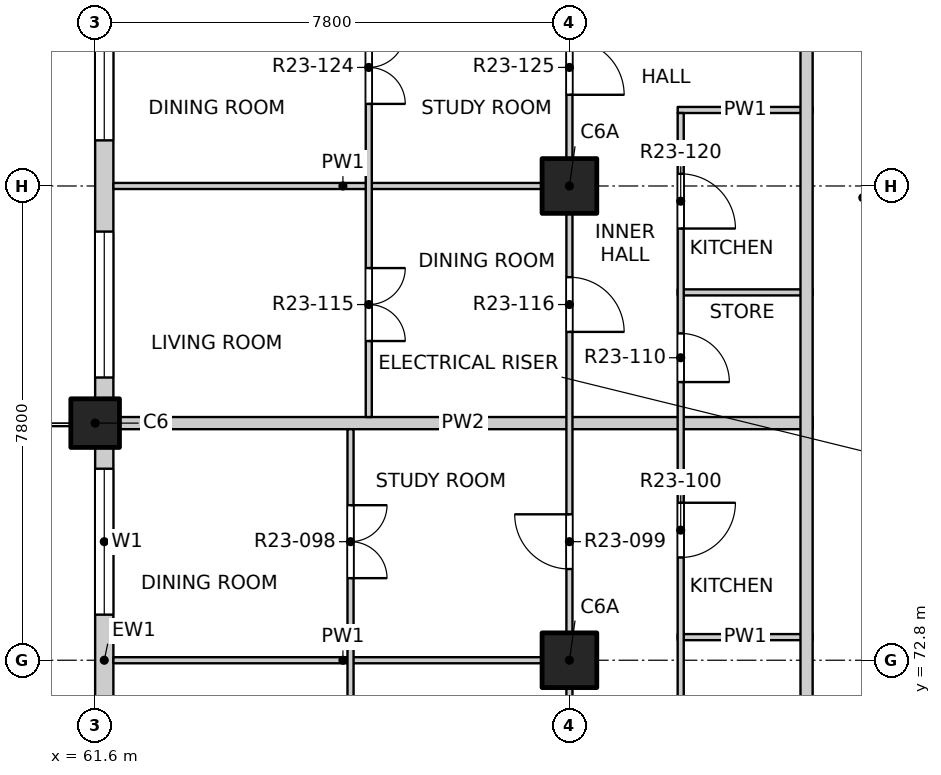
"""IFC4 building model, lengths in metres.
Left out: names, types, materials, properties, quantities, classifications, styles, units other than length and angle.
Written with IfcOpenShell. Run it as: python <this file> out.ifc"""

import sys

from ifc_helpers import new_model, si_unit, direction, frame, frame_2d, origin, origin_2d, place, context, subcontext, project, spatial, rectangle, extrude, element, fill, save


model = new_model("IFC4")
c1 = context("Model", 3, precision=1e-05, world=origin(), true_north=direction((0.0, 1.0)))
c2 = subcontext(c1, "Body", "Model", "MODEL_VIEW")
j1 = project(units=[si_unit("LENGTHUNIT", "METRE"), si_unit("PLANEANGLEUNIT", "RADIAN")], contexts=[c1])
p1 = place(None, origin())
s1 = spatial("IfcSite", under=j1, at=p1, CompositionType="ELEMENT")
p2 = place(p1, origin())
s2 = spatial("IfcBuilding", under=s1, at=p2, CompositionType="ELEMENT")
p3 = place(p2, frame((0.0, 0.0, 234.7)))
s3 = spatial("IfcBuildingStorey", under=s2, at=p3, CompositionType="ELEMENT", Elevation=234.7)
p4 = place(p3, frame((61.6, 76.7, -0.25), z_axis=(0.0, 0.0, 1.0), x_axis=(1.0, 0.0, 0.0)))
e1 = element("IfcColumn", 1, at=p4, inside=s3, PredefinedType="COLUMN", context=c2, shape_type="SweptSolid", body=[
    extrude(rectangle(XDim=0.8, YDim=0.8, at=origin_2d()), origin(), (0.0, 0.0, 1.0), 3.4),
])
for number, where, z_axis, x_axis in (
    (2, (69.4, 72.8, -0.25), (0.0, 0.0, 1.0), (1.0, 0.0, 0.0)),
    (3, (69.4, 80.6, -0.25), (0.0, 0.0, 1.0), (1.0, 0.0, 0.0)),
):
    element("IfcColumn", number, at=place(p3, frame(where, z_axis=z_axis, x_axis=x_axis)), inside=s3, PredefinedType="COLUMN", context=c2, shape_type="SweptSolid", body=[
        extrude(rectangle(XDim=0.9, YDim=0.9, at=origin_2d()), origin(), (0.0, 0.0, 1.0), 3.4),
    ])
p5 = place(p3, frame((61.75, 69.3, 0.0), z_axis=(0.0, 0.0, 1.0), x_axis=(0.0, 1.0, 0.0)))
e4 = element("IfcWall", 4, at=p5, inside=s3, PredefinedType="SOLIDWALL", context=c2, shape_type="SweptSolid", body=[
    extrude(rectangle(XDim=7.0, YDim=0.3, at=frame_2d((3.5, 0.0))), origin(), (0.0, 0.0, 1.0), 2.7),
])
p6 = place(p5, frame((0.65, 0.0, 0.0)))
e5 = element("IfcOpeningElement", 5, at=p6, cuts=e4, PredefinedType="OPENING", context=c2, shape_type="SweptSolid", body=[
    extrude(rectangle(XDim=1.8, YDim=2.4, at=frame_2d((0.9, 1.2))), frame((0.0, 0.16, 0.0), z_axis=(0.0, -1.0, 0.0), x_axis=(1.0, 0.0, 0.0)), (0.0, 0.0, 1.0), 0.32),
])
p7 = place(p5, frame((4.25, 0.0, 0.9)))
e6 = element("IfcOpeningElement", 6, at=p7, cuts=e4, PredefinedType="OPENING", context=c2, shape_type="SweptSolid", body=[
    extrude(rectangle(XDim=2.4, YDim=1.8, at=frame_2d((1.2, 0.9))), frame((0.0, 0.16, 0.0), z_axis=(0.0, -1.0, 0.0), x_axis=(1.0, 0.0, 0.0)), (0.0, 0.0, 1.0), 0.32),
])
p8 = place(p3, frame((61.75, 77.1, 0.0), z_axis=(0.0, 0.0, 1.0), x_axis=(0.0, 1.0, 0.0)))
e7 = element("IfcWall", 7, at=p8, inside=s3, PredefinedType="SOLIDWALL", context=c2, shape_type="SweptSolid", body=[
    extrude(rectangle(XDim=7.4, YDim=0.3, at=frame_2d((3.7, 0.0))), origin(), (0.0, 0.0, 1.0), 2.7),
])
p9 = place(p8, frame((0.35, 0.0, 0.9)))
e8 = element("IfcOpeningElement", 8, at=p9, cuts=e7, PredefinedType="OPENING", context=c2, shape_type="SweptSolid", body=[
    extrude(rectangle(XDim=2.4, YDim=1.8, at=frame_2d((1.2, 0.9))), frame((0.0, 0.16, 0.0), z_axis=(0.0, -1.0, 0.0), x_axis=(1.0, 0.0, 0.0)), (0.0, 0.0, 1.0), 0.32),
])
p10 = place(p8, frame((4.25, 0.0, 0.9)))
e9 = element("IfcOpeningElement", 9, at=p10, cuts=e7, PredefinedType="OPENING", context=c2, shape_type="SweptSolid", body=[
    extrude(rectangle(XDim=2.4, YDim=1.8, at=frame_2d((1.2, 0.9))), frame((0.0, 0.16, 0.0), z_axis=(0.0, -1.0, 0.0), x_axis=(1.0, 0.0, 0.0)), (0.0, 0.0, 1.0), 0.32),
])
p11 = place(p3, frame((61.9, 72.8, 0.0), z_axis=(0.0, 0.0, 1.0), x_axis=(1.0, 0.0, 0.0)))
e10 = element("IfcWall", 10, at=p11, inside=s3, PredefinedType="PARTITIONING", context=c2, shape_type="SweptSolid", body=[
    extrude(rectangle(XDim=7.55, YDim=0.1, at=frame_2d((3.775, 0.0))), origin(), (0.0, 0.0, 1.0), 3.15),
])
p12 = place(p3, frame((71.18, 73.18, 0.0), z_axis=(0.0, 0.0, 1.0), x_axis=(1.0, 0.0, 0.0)))
e11 = element("IfcWall", 11, at=p12, inside=s3, PredefinedType="PARTITIONING", context=c2, shape_type="SweptSolid", body=[
    extrude(rectangle(XDim=2.22, YDim=0.1, at=frame_2d((1.11, 0.0))), origin(), (0.0, 0.0, 1.0), 3.15),
])
p13 = place(p3, frame((61.9, 76.7, 0.0), z_axis=(0.0, 0.0, 1.0), x_axis=(1.0, 0.0, 0.0)))
e12 = element("IfcWall", 12, at=p13, inside=s3, PredefinedType="PARTITIONING", context=c2, shape_type="SweptSolid", body=[
    extrude(rectangle(XDim=11.5, YDim=0.2, at=frame_2d((5.75, 0.0))), origin(), (0.0, 0.0, 1.0), 2.55),
])
p14 = place(p3, frame((71.18, 78.85, 0.0), z_axis=(0.0, 0.0, 1.0), x_axis=(1.0, 0.0, 0.0)))
e13 = element("IfcWall", 13, at=p14, inside=s3, PredefinedType="PARTITIONING", context=c2, shape_type="SweptSolid", body=[
    extrude(rectangle(XDim=2.22, YDim=0.1, at=frame_2d((1.11, 0.0))), origin(), (0.0, 0.0, 1.0), 3.15),
])
p15 = place(p3, frame((61.9, 80.6, 0.0), z_axis=(0.0, 0.0, 1.0), x_axis=(1.0, 0.0, 0.0)))
e14 = element("IfcWall", 14, at=p15, inside=s3, PredefinedType="PARTITIONING", context=c2, shape_type="SweptSolid", body=[
    extrude(rectangle(XDim=7.55, YDim=0.1, at=frame_2d((3.775, 0.0))), origin(), (0.0, 0.0, 1.0), 3.15),
])
p16 = place(p3, frame((71.18, 81.85, 0.0), z_axis=(0.0, 0.0, 1.0), x_axis=(1.0, 0.0, 0.0)))
e15 = element("IfcWall", 15, at=p16, inside=s3, PredefinedType="PARTITIONING", context=c2, shape_type="SweptSolid", body=[
    extrude(rectangle(XDim=2.22, YDim=0.1, at=frame_2d((1.11, 0.0))), origin(), (0.0, 0.0, 1.0), 3.15),
])
p17 = place(p3, frame((65.8, 61.2, 0.0), z_axis=(0.0, 0.0, 1.0), x_axis=(0.0, 1.0, 0.0)))
e16 = element("IfcWall", 16, at=p17, inside=s3, PredefinedType="PARTITIONING", context=c2, shape_type="SweptSolid", body=[
    extrude(rectangle(XDim=15.4, YDim=0.1, at=frame_2d((7.7, 0.0))), origin(), (0.0, 0.0, 1.0), 3.15),
])
p18 = place(p17, frame((0.425, 0.0, 0.0)))
e17 = element("IfcOpeningElement", 17, at=p18, cuts=e16, PredefinedType="OPENING", context=c2, shape_type="SweptSolid", body=[
    extrude(rectangle(XDim=0.9, YDim=2.1, at=frame_2d((0.45, 1.05))), frame((0.0, 0.06, 0.0), z_axis=(0.0, -1.0, 0.0), x_axis=(1.0, 0.0, 0.0)), (0.0, 0.0, 1.0), 0.12),
])
p19 = place(p17, frame((2.375, 0.0, 0.0)))
e18 = element("IfcOpeningElement", 18, at=p19, cuts=e16, PredefinedType="OPENING", context=c2, shape_type="SweptSolid", body=[
    extrude(rectangle(XDim=0.9, YDim=2.1, at=frame_2d((0.45, 1.05))), frame((0.0, 0.06, 0.0), z_axis=(0.0, -1.0, 0.0), x_axis=(1.0, 0.0, 0.0)), (0.0, 0.0, 1.0), 0.12),
])
p20 = place(p17, frame((4.325, 0.0, 0.0)))
e19 = element("IfcOpeningElement", 19, at=p20, cuts=e16, PredefinedType="OPENING", context=c2, shape_type="SweptSolid", body=[
    extrude(rectangle(XDim=0.9, YDim=2.1, at=frame_2d((0.45, 1.05))), frame((0.0, 0.06, 0.0), z_axis=(0.0, -1.0, 0.0), x_axis=(1.0, 0.0, 0.0)), (0.0, 0.0, 1.0), 0.12),
])
p21 = place(p17, frame((6.275, 0.0, 0.0)))
e20 = element("IfcOpeningElement", 20, at=p21, cuts=e16, PredefinedType="OPENING", context=c2, shape_type="SweptSolid", body=[
    extrude(rectangle(XDim=0.9, YDim=2.1, at=frame_2d((0.45, 1.05))), frame((0.0, 0.06, 0.0), z_axis=(0.0, -1.0, 0.0), x_axis=(1.0, 0.0, 0.0)), (0.0, 0.0, 1.0), 0.12),
])
p22 = place(p17, frame((9.05, 0.0, 0.0)))
e21 = element("IfcOpeningElement", 21, at=p22, cuts=e16, PredefinedType="OPENING", context=c2, shape_type="SweptSolid", body=[
    extrude(rectangle(XDim=1.2, YDim=2.1, at=frame_2d((0.6, 1.05))), frame((0.0, 0.06, 0.0), z_axis=(0.0, -1.0, 0.0), x_axis=(1.0, 0.0, 0.0)), (0.0, 0.0, 1.0), 0.12),
])
p23 = place(p17, frame((12.95, 0.0, 0.0)))
e22 = element("IfcOpeningElement", 22, at=p23, cuts=e16, PredefinedType="OPENING", context=c2, shape_type="SweptSolid", body=[
    extrude(rectangle(XDim=1.2, YDim=2.1, at=frame_2d((0.6, 1.05))), frame((0.0, 0.06, 0.0), z_axis=(0.0, -1.0, 0.0), x_axis=(1.0, 0.0, 0.0)), (0.0, 0.0, 1.0), 0.12),
])
p24 = place(p3, frame((66.1, 76.8, 0.0), z_axis=(0.0, 0.0, 1.0), x_axis=(0.0, 1.0, 0.0)))
e23 = element("IfcWall", 23, at=p24, inside=s3, PredefinedType="PARTITIONING", context=c2, shape_type="SweptSolid", body=[
    extrude(rectangle(XDim=11.3, YDim=0.1, at=frame_2d((5.65, 0.0))), origin(), (0.0, 0.0, 1.0), 3.15),
])
p25 = place(p24, frame((1.25, 0.0, 0.0)))
e24 = element("IfcOpeningElement", 24, at=p25, cuts=e23, PredefinedType="OPENING", context=c2, shape_type="SweptSolid", body=[
    extrude(rectangle(XDim=1.2, YDim=2.1, at=frame_2d((0.6, 1.05))), frame((0.0, 0.06, 0.0), z_axis=(0.0, -1.0, 0.0), x_axis=(1.0, 0.0, 0.0)), (0.0, 0.0, 1.0), 0.12),
])
p26 = place(p24, frame((5.15, 0.0, 0.0)))
e25 = element("IfcOpeningElement", 25, at=p26, cuts=e23, PredefinedType="OPENING", context=c2, shape_type="SweptSolid", body=[
    extrude(rectangle(XDim=1.2, YDim=2.1, at=frame_2d((0.6, 1.05))), frame((0.0, 0.06, 0.0), z_axis=(0.0, -1.0, 0.0), x_axis=(1.0, 0.0, 0.0)), (0.0, 0.0, 1.0), 0.12),
])
p27 = place(p24, frame((9.05, 0.0, 0.0)))
e26 = element("IfcOpeningElement", 26, at=p27, cuts=e23, PredefinedType="OPENING", context=c2, shape_type="SweptSolid", body=[
    extrude(rectangle(XDim=1.2, YDim=2.1, at=frame_2d((0.6, 1.05))), frame((0.0, 0.06, 0.0), z_axis=(0.0, -1.0, 0.0), x_axis=(1.0, 0.0, 0.0)), (0.0, 0.0, 1.0), 0.12),
])
p28 = place(p3, frame((69.4, 41.9, 0.0), z_axis=(0.0, 0.0, 1.0), x_axis=(0.0, 1.0, 0.0)))
e27 = element("IfcWall", 27, at=p28, inside=s3, PredefinedType="PARTITIONING", context=c2, shape_type="SweptSolid", body=[
    extrude(rectangle(XDim=46.2, YDim=0.1, at=frame_2d((23.1, 0.0))), origin(), (0.0, 0.0, 1.0), 3.15),
])
p29 = place(p28, frame((1.2, 0.0, 0.0)))
e28 = element("IfcOpeningElement", 28, at=p29, cuts=e27, PredefinedType="OPENING", context=c2, shape_type="SweptSolid", body=[
    extrude(rectangle(XDim=0.9, YDim=2.1, at=frame_2d((0.45, 1.05))), frame((0.0, 0.06, 0.0), z_axis=(0.0, -1.0, 0.0), x_axis=(1.0, 0.0, 0.0)), (0.0, 0.0, 1.0), 0.12),
])
p30 = place(p28, frame((6.025, 0.0, 0.0)))
e29 = element("IfcOpeningElement", 29, at=p30, cuts=e27, PredefinedType="OPENING", context=c2, shape_type="SweptSolid", body=[
    extrude(rectangle(XDim=0.9, YDim=2.1, at=frame_2d((0.45, 1.05))), frame((0.0, 0.06, 0.0), z_axis=(0.0, -1.0, 0.0), x_axis=(1.0, 0.0, 0.0)), (0.0, 0.0, 1.0), 0.12),
])
p31 = place(p28, frame((9.975, 0.0, 0.0)))
e30 = element("IfcOpeningElement", 30, at=p31, cuts=e27, PredefinedType="OPENING", context=c2, shape_type="SweptSolid", body=[
    extrude(rectangle(XDim=0.9, YDim=2.1, at=frame_2d((0.45, 1.05))), frame((0.0, 0.06, 0.0), z_axis=(0.0, -1.0, 0.0), x_axis=(1.0, 0.0, 0.0)), (0.0, 0.0, 1.0), 0.12),
])
p32 = place(p28, frame((12.9, 0.0, 0.0)))
e31 = element("IfcOpeningElement", 31, at=p32, cuts=e27, PredefinedType="OPENING", context=c2, shape_type="SweptSolid", body=[
    extrude(rectangle(XDim=0.9, YDim=2.1, at=frame_2d((0.45, 1.05))), frame((0.0, 0.06, 0.0), z_axis=(0.0, -1.0, 0.0), x_axis=(1.0, 0.0, 0.0)), (0.0, 0.0, 1.0), 0.12),
])
p33 = place(p28, frame((17.775, 0.0, 0.0)))
e32 = element("IfcOpeningElement", 32, at=p33, cuts=e27, PredefinedType="OPENING", context=c2, shape_type="SweptSolid", body=[
    extrude(rectangle(XDim=0.9, YDim=2.1, at=frame_2d((0.45, 1.05))), frame((0.0, 0.06, 0.0), z_axis=(0.0, -1.0, 0.0), x_axis=(1.0, 0.0, 0.0)), (0.0, 0.0, 1.0), 0.12),
])
p34 = place(p28, frame((21.625, 0.0, 0.0)))
e33 = element("IfcOpeningElement", 33, at=p34, cuts=e27, PredefinedType="OPENING", context=c2, shape_type="SweptSolid", body=[
    extrude(rectangle(XDim=0.9, YDim=2.1, at=frame_2d((0.45, 1.05))), frame((0.0, 0.06, 0.0), z_axis=(0.0, -1.0, 0.0), x_axis=(1.0, 0.0, 0.0)), (0.0, 0.0, 1.0), 0.12),
])
p35 = place(p28, frame((25.575, 0.0, 0.0)))
e34 = element("IfcOpeningElement", 34, at=p35, cuts=e27, PredefinedType="OPENING", context=c2, shape_type="SweptSolid", body=[
    extrude(rectangle(XDim=0.9, YDim=2.1, at=frame_2d((0.45, 1.05))), frame((0.0, 0.06, 0.0), z_axis=(0.0, -1.0, 0.0), x_axis=(1.0, 0.0, 0.0)), (0.0, 0.0, 1.0), 0.12),
])
p36 = place(p28, frame((28.5, 0.0, 0.0)))
e35 = element("IfcOpeningElement", 35, at=p36, cuts=e27, PredefinedType="OPENING", context=c2, shape_type="SweptSolid", body=[
    extrude(rectangle(XDim=0.9, YDim=2.1, at=frame_2d((0.45, 1.05))), frame((0.0, 0.06, 0.0), z_axis=(0.0, -1.0, 0.0), x_axis=(1.0, 0.0, 0.0)), (0.0, 0.0, 1.0), 0.12),
])
p37 = place(p28, frame((32.4, 0.0, 0.0)))
e36 = element("IfcOpeningElement", 36, at=p37, cuts=e27, PredefinedType="OPENING", context=c2, shape_type="SweptSolid", body=[
    extrude(rectangle(XDim=0.9, YDim=2.1, at=frame_2d((0.45, 1.05))), frame((0.0, 0.06, 0.0), z_axis=(0.0, -1.0, 0.0), x_axis=(1.0, 0.0, 0.0)), (0.0, 0.0, 1.0), 0.12),
])
p38 = place(p28, frame((36.3, 0.0, 0.0)))
e37 = element("IfcOpeningElement", 37, at=p38, cuts=e27, PredefinedType="OPENING", context=c2, shape_type="SweptSolid", body=[
    extrude(rectangle(XDim=0.9, YDim=2.1, at=frame_2d((0.45, 1.05))), frame((0.0, 0.06, 0.0), z_axis=(0.0, -1.0, 0.0), x_axis=(1.0, 0.0, 0.0)), (0.0, 0.0, 1.0), 0.12),
])
p39 = place(p28, frame((40.2, 0.0, 0.0)))
e38 = element("IfcOpeningElement", 38, at=p39, cuts=e27, PredefinedType="OPENING", context=c2, shape_type="SweptSolid", body=[
    extrude(rectangle(XDim=0.9, YDim=2.1, at=frame_2d((0.45, 1.05))), frame((0.0, 0.06, 0.0), z_axis=(0.0, -1.0, 0.0), x_axis=(1.0, 0.0, 0.0)), (0.0, 0.0, 1.0), 0.12),
])
p40 = place(p28, frame((44.1, 0.0, 0.0)))
e39 = element("IfcOpeningElement", 39, at=p40, cuts=e27, PredefinedType="OPENING", context=c2, shape_type="SweptSolid", body=[
    extrude(rectangle(XDim=0.9, YDim=2.1, at=frame_2d((0.45, 1.05))), frame((0.0, 0.06, 0.0), z_axis=(0.0, -1.0, 0.0), x_axis=(1.0, 0.0, 0.0)), (0.0, 0.0, 1.0), 0.12),
])
p41 = place(p3, frame((71.23, 63.95, 0.0), z_axis=(0.0, 0.0, 1.0), x_axis=(0.0, 1.0, 0.0)))
e40 = element("IfcWall", 40, at=p41, inside=s3, PredefinedType="PARTITIONING", context=c2, shape_type="SweptSolid", body=[
    extrude(rectangle(XDim=17.85, YDim=0.1, at=frame_2d((8.925, 0.0))), origin(), (0.0, 0.0, 1.0), 3.15),
])
p42 = place(p41, frame((0.7, 0.0, 0.0)))
e41 = element("IfcOpeningElement", 41, at=p42, cuts=e40, PredefinedType="OPENING", context=c2, shape_type="SweptSolid", body=[
    extrude(rectangle(XDim=0.9, YDim=2.1, at=frame_2d((0.45, 1.05))), frame((0.0, 0.06, 0.0), z_axis=(0.0, -1.0, 0.0), x_axis=(1.0, 0.0, 0.0)), (0.0, 0.0, 1.0), 0.12),
])
p43 = place(p41, frame((3.1, 0.0, 0.0)))
e42 = element("IfcOpeningElement", 42, at=p43, cuts=e40, PredefinedType="OPENING", context=c2, shape_type="SweptSolid", body=[
    extrude(rectangle(XDim=0.8, YDim=2.1, at=frame_2d((0.4, 1.05))), frame((0.0, 0.06, 0.0), z_axis=(0.0, -1.0, 0.0), x_axis=(1.0, 0.0, 0.0)), (0.0, 0.0, 1.0), 0.12),
])
p44 = place(p41, frame((5.115, 0.0, 0.0)))
e43 = element("IfcOpeningElement", 43, at=p44, cuts=e40, PredefinedType="OPENING", context=c2, shape_type="SweptSolid", body=[
    extrude(rectangle(XDim=0.9, YDim=2.1, at=frame_2d((0.45, 1.05))), frame((0.0, 0.06, 0.0), z_axis=(0.0, -1.0, 0.0), x_axis=(1.0, 0.0, 0.0)), (0.0, 0.0, 1.0), 0.12),
])
p45 = place(p41, frame((7.455, 0.0, 0.0)))
e44 = element("IfcOpeningElement", 44, at=p45, cuts=e40, PredefinedType="OPENING", context=c2, shape_type="SweptSolid", body=[
    extrude(rectangle(XDim=0.8, YDim=2.1, at=frame_2d((0.4, 1.05))), frame((0.0, 0.06, 0.0), z_axis=(0.0, -1.0, 0.0), x_axis=(1.0, 0.0, 0.0)), (0.0, 0.0, 1.0), 0.12),
])
p46 = place(p41, frame((10.54, 0.0, 0.0)))
e45 = element("IfcOpeningElement", 45, at=p46, cuts=e40, PredefinedType="OPENING", context=c2, shape_type="SweptSolid", body=[
    extrude(rectangle(XDim=0.9, YDim=2.1, at=frame_2d((0.45, 1.05))), frame((0.0, 0.06, 0.0), z_axis=(0.0, -1.0, 0.0), x_axis=(1.0, 0.0, 0.0)), (0.0, 0.0, 1.0), 0.12),
])
p47 = place(p41, frame((13.425, 0.0, 0.0)))
e46 = element("IfcOpeningElement", 46, at=p47, cuts=e40, PredefinedType="OPENING", context=c2, shape_type="SweptSolid", body=[
    extrude(rectangle(XDim=0.8, YDim=2.1, at=frame_2d((0.4, 1.05))), frame((0.0, 0.06, 0.0), z_axis=(0.0, -1.0, 0.0), x_axis=(1.0, 0.0, 0.0)), (0.0, 0.0, 1.0), 0.12),
])
p48 = place(p41, frame((15.95, 0.0, 0.0)))
e47 = element("IfcOpeningElement", 47, at=p48, cuts=e40, PredefinedType="OPENING", context=c2, shape_type="SweptSolid", body=[
    extrude(rectangle(XDim=0.9, YDim=2.1, at=frame_2d((0.45, 1.05))), frame((0.0, 0.06, 0.0), z_axis=(0.0, -1.0, 0.0), x_axis=(1.0, 0.0, 0.0)), (0.0, 0.0, 1.0), 0.12),
])
p49 = place(p3, frame((73.3, 49.5, 0.0), z_axis=(0.0, 0.0, 1.0), x_axis=(0.0, 1.0, 0.0)))
e48 = element("IfcWall", 48, at=p49, inside=s3, PredefinedType="PARTITIONING", context=c2, shape_type="SweptSolid", body=[
    extrude(rectangle(XDim=34.9, YDim=0.2, at=frame_2d((17.45, 0.0))), origin(), (0.0, 0.0, 1.0), 3.15),
])
p50 = place(p49, frame((3.075, 0.0, 0.0)))
e49 = element("IfcOpeningElement", 49, at=p50, cuts=e48, PredefinedType="OPENING", context=c2, shape_type="SweptSolid", body=[
    extrude(rectangle(XDim=1.0, YDim=2.1, at=frame_2d((0.5, 1.05))), frame((0.0, 0.11, 0.0), z_axis=(0.0, -1.0, 0.0), x_axis=(1.0, 0.0, 0.0)), (0.0, 0.0, 1.0), 0.22),
])
p51 = place(p49, frame((14.575, 0.0, 0.0)))
e50 = element("IfcOpeningElement", 50, at=p51, cuts=e48, PredefinedType="OPENING", context=c2, shape_type="SweptSolid", body=[
    extrude(rectangle(XDim=1.0, YDim=2.1, at=frame_2d((0.5, 1.05))), frame((0.0, 0.11, 0.0), z_axis=(0.0, -1.0, 0.0), x_axis=(1.0, 0.0, 0.0)), (0.0, 0.0, 1.0), 0.22),
])
p52 = place(p49, frame((33.625, 0.0, 0.0)))
e51 = element("IfcOpeningElement", 51, at=p52, cuts=e48, PredefinedType="OPENING", context=c2, shape_type="SweptSolid", body=[
    extrude(rectangle(XDim=1.0, YDim=2.1, at=frame_2d((0.5, 1.05))), frame((0.0, 0.11, 0.0), z_axis=(0.0, -1.0, 0.0), x_axis=(1.0, 0.0, 0.0)), (0.0, 0.0, 1.0), 0.22),
])
p53 = place(p7, origin())
e52 = element("IfcWindow", 52, at=p53, inside=s3, PartitioningType="DOUBLE_PANEL_VERTICAL", PredefinedType="WINDOW", context=c2, shape_type="SweptSolid", body=[
    extrude(rectangle(XDim=2.4, YDim=1.8, at=frame_2d((1.2, 0.9))), frame((0.0, 0.03, 0.0), z_axis=(0.0, -1.0, 0.0), x_axis=(1.0, 0.0, 0.0)), (0.0, 0.0, 1.0), 0.06),
])
fill(e6, e52)
p54 = place(p9, origin())
e53 = element("IfcWindow", 53, at=p54, inside=s3, PartitioningType="DOUBLE_PANEL_VERTICAL", PredefinedType="WINDOW", context=c2, shape_type="SweptSolid", body=[
    extrude(rectangle(XDim=2.4, YDim=1.8, at=frame_2d((1.2, 0.9))), frame((0.0, 0.03, 0.0), z_axis=(0.0, -1.0, 0.0), x_axis=(1.0, 0.0, 0.0)), (0.0, 0.0, 1.0), 0.06),
])
fill(e8, e53)
p55 = place(p10, origin())
e54 = element("IfcWindow", 54, at=p55, inside=s3, PartitioningType="DOUBLE_PANEL_VERTICAL", PredefinedType="WINDOW", context=c2, shape_type="SweptSolid", body=[
    extrude(rectangle(XDim=2.4, YDim=1.8, at=frame_2d((1.2, 0.9))), frame((0.0, 0.03, 0.0), z_axis=(0.0, -1.0, 0.0), x_axis=(1.0, 0.0, 0.0)), (0.0, 0.0, 1.0), 0.06),
])
fill(e9, e54)
p56 = place(p23, origin())
e55 = element("IfcDoor", 55, at=p56, inside=s3, OperationType="DOUBLE_DOOR_SINGLE_SWING", PredefinedType="DOOR", context=c2, shape_type="SweptSolid", body=[
    extrude(rectangle(XDim=1.2, YDim=2.1, at=frame_2d((0.6, 1.05))), frame((0.0, 0.025, 0.0), z_axis=(0.0, -1.0, 0.0), x_axis=(1.0, 0.0, 0.0)), (0.0, 0.0, 1.0), 0.05),
])
fill(e22, e55)
p57 = place(p37, origin())
e56 = element("IfcDoor", 56, at=p57, inside=s3, OperationType="SINGLE_SWING_RIGHT", PredefinedType="DOOR", context=c2, shape_type="SweptSolid", body=[
    extrude(rectangle(XDim=0.9, YDim=2.1, at=frame_2d((0.45, 1.05))), frame((0.0, 0.025, 0.0), z_axis=(0.0, -1.0, 0.0), x_axis=(1.0, 0.0, 0.0)), (0.0, 0.0, 1.0), 0.05),
])
fill(e36, e56)
p58 = place(p46, origin())
e57 = element("IfcDoor", 57, at=p58, inside=s3, OperationType="SINGLE_SWING_LEFT", PredefinedType="DOOR", context=c2, shape_type="SweptSolid", body=[
    extrude(rectangle(XDim=0.9, YDim=2.1, at=frame_2d((0.45, 1.05))), frame((0.0, 0.025, 0.0), z_axis=(0.0, -1.0, 0.0), x_axis=(1.0, 0.0, 0.0)), (0.0, 0.0, 1.0), 0.05),
])
fill(e45, e57)
p59 = place(p47, origin())
e58 = element("IfcDoor", 58, at=p59, inside=s3, OperationType="SINGLE_SWING_RIGHT", PredefinedType="DOOR", context=c2, shape_type="SweptSolid", body=[
    extrude(rectangle(XDim=0.8, YDim=2.1, at=frame_2d((0.4, 1.05))), frame((0.0, 0.025, 0.0), z_axis=(0.0, -1.0, 0.0), x_axis=(1.0, 0.0, 0.0)), (0.0, 0.0, 1.0), 0.05),
])
fill(e46, e58)
p60 = place(p25, origin())
e59 = element("IfcDoor", 59, at=p60, inside=s3, OperationType="DOUBLE_DOOR_SINGLE_SWING", PredefinedType="DOOR", context=c2, shape_type="SweptSolid", body=[
    extrude(rectangle(XDim=1.2, YDim=2.1, at=frame_2d((0.6, 1.05))), frame((0.0, 0.025, 0.0), z_axis=(0.0, -1.0, 0.0), x_axis=(1.0, 0.0, 0.0)), (0.0, 0.0, 1.0), 0.05),
])
fill(e24, e59)
p61 = place(p38, origin())
e60 = element("IfcDoor", 60, at=p61, inside=s3, OperationType="SINGLE_SWING_RIGHT", PredefinedType="DOOR", context=c2, shape_type="SweptSolid", body=[
    extrude(rectangle(XDim=0.9, YDim=2.1, at=frame_2d((0.45, 1.05))), frame((0.0, 0.025, 0.0), z_axis=(0.0, -1.0, 0.0), x_axis=(1.0, 0.0, 0.0)), (0.0, 0.0, 1.0), 0.05),
])
fill(e37, e60)
p62 = place(p48, origin())
e61 = element("IfcDoor", 61, at=p62, inside=s3, OperationType="SINGLE_SWING_RIGHT", PredefinedType="DOOR", context=c2, shape_type="SweptSolid", body=[
    extrude(rectangle(XDim=0.9, YDim=2.1, at=frame_2d((0.45, 1.05))), frame((0.0, 0.025, 0.0), z_axis=(0.0, -1.0, 0.0), x_axis=(1.0, 0.0, 0.0)), (0.0, 0.0, 1.0), 0.05),
])
fill(e47, e61)
p63 = place(p26, origin())
e62 = element("IfcDoor", 62, at=p63, inside=s3, OperationType="DOUBLE_DOOR_SINGLE_SWING", PredefinedType="DOOR", context=c2, shape_type="SweptSolid", body=[
    extrude(rectangle(XDim=1.2, YDim=2.1, at=frame_2d((0.6, 1.05))), frame((0.0, 0.025, 0.0), z_axis=(0.0, -1.0, 0.0), x_axis=(1.0, 0.0, 0.0)), (0.0, 0.0, 1.0), 0.05),
])
fill(e25, e62)
p64 = place(p39, origin())
e63 = element("IfcDoor", 63, at=p64, inside=s3, OperationType="SINGLE_SWING_RIGHT", PredefinedType="DOOR", context=c2, shape_type="SweptSolid", body=[
    extrude(rectangle(XDim=0.9, YDim=2.1, at=frame_2d((0.45, 1.05))), frame((0.0, 0.025, 0.0), z_axis=(0.0, -1.0, 0.0), x_axis=(1.0, 0.0, 0.0)), (0.0, 0.0, 1.0), 0.05),
])
fill(e38, e63)
save(model, sys.argv[1])
